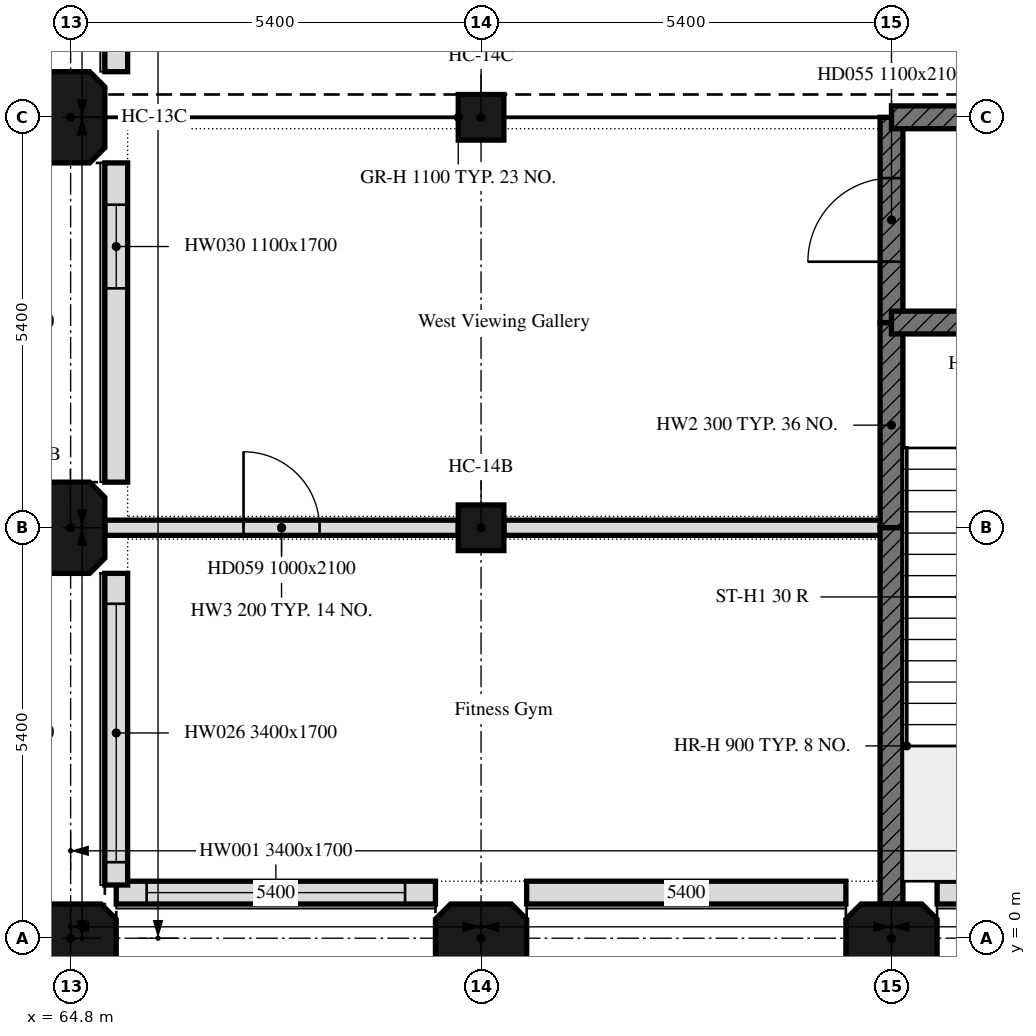
"""IFC4 building model, lengths in metres.
Left out: names, types, materials, properties, quantities, classifications, styles, units other than length and angle.
Written with IfcOpenShell. Run it as: python <this file> out.ifc"""

import sys

from ifc_helpers import new_model, si_unit, direction, frame, frame_2d, origin, origin_2d, place, context, subcontext, project, spatial, polyline, rectangle, outline, extrude, element, fill, save


model = new_model("IFC4")
c1 = context("Model", 3, precision=1e-05, world=origin(), true_north=direction((0.0, 1.0)))
c2 = subcontext(c1, "Body", "Model", "MODEL_VIEW")
j1 = project(units=[si_unit("LENGTHUNIT", "METRE"), si_unit("PLANEANGLEUNIT", "RADIAN")], contexts=[c1])
p1 = place(None, origin())
s1 = spatial("IfcSite", under=j1, at=p1, CompositionType="ELEMENT")
p2 = place(p1, origin())
s2 = spatial("IfcBuilding", under=s1, at=p2, CompositionType="ELEMENT")
p3 = place(p2, frame((0.0, 0.0, 14.4)))
s3 = spatial("IfcBuildingStorey", under=s2, at=p3, CompositionType="ELEMENT", Elevation=14.4)
for number, where, z_axis, x_axis in (
    (1, (64.8, 0.0, 0.0), (0.0, 0.0, 1.0), (1.0, 0.0, 0.0)),
    (2, (64.8, 5.4, 0.0), (0.0, 0.0, 1.0), (0.0, 1.0, 0.0)),
    (3, (64.8, 10.8, 0.0), (0.0, 0.0, 1.0), (0.0, 1.0, 0.0)),
    (4, (70.2, 0.0, 0.0), (0.0, 0.0, 1.0), (1.0, 0.0, 0.0)),
):
    element("IfcColumn", number, at=place(p3, frame(where, z_axis=z_axis, x_axis=x_axis)), inside=s3, PredefinedType="COLUMN", context=c2, shape_type="SweptSolid", body=[
        extrude(outline(polyline([(-0.4, -0.45), (0.4, -0.45), (0.6, -0.25), (0.6, 0.25), (0.4, 0.45), (-0.4, 0.45), (-0.6, 0.25), (-0.6, -0.25), (-0.4, -0.45)])), origin(), (0.0, 0.0, 1.0), 5.1),
    ])
for number, where, z_axis, x_axis in (
    (5, (70.2, 5.4, 0.0), (0.0, 0.0, 1.0), (1.0, 0.0, 0.0)),
    (6, (70.2, 10.8, 0.0), (0.0, 0.0, 1.0), (1.0, 0.0, 0.0)),
):
    element("IfcColumn", number, at=place(p3, frame(where, z_axis=z_axis, x_axis=x_axis)), inside=s3, PredefinedType="COLUMN", context=c2, shape_type="SweptSolid", body=[
        extrude(rectangle(XDim=0.6, YDim=0.6, at=origin_2d()), origin(), (0.0, 0.0, 1.0), 5.1),
    ])
p4 = place(p3, frame((75.6, 0.0, 0.0), z_axis=(0.0, 0.0, 1.0), x_axis=(1.0, 0.0, 0.0)))
e7 = element("IfcColumn", 7, at=p4, inside=s3, PredefinedType="COLUMN", context=c2, shape_type="SweptSolid", body=[
    extrude(outline(polyline([(-0.4, -0.45), (0.4, -0.45), (0.6, -0.25), (0.6, 0.25), (0.4, 0.45), (-0.4, 0.45), (-0.6, 0.25), (-0.6, -0.25), (-0.4, -0.45)])), origin(), (0.0, 0.0, 1.0), 5.1),
])
p5 = place(p3, frame((65.4, 0.6, 0.0), z_axis=(0.0, 0.0, 1.0), x_axis=(1.0, 0.0, 0.0)))
e8 = element("IfcWall", 8, at=p5, inside=s3, PredefinedType="SOLIDWALL", context=c2, shape_type="SweptSolid", body=[
    extrude(rectangle(XDim=4.2, YDim=0.3, at=frame_2d((2.1, 0.0))), origin(), (0.0, 0.0, 1.0), 5.1),
])
p6 = place(p5, frame((0.4, 0.0, 0.9)))
e9 = element("IfcOpeningElement", 9, at=p6, cuts=e8, PredefinedType="OPENING", context=c2, shape_type="SweptSolid", body=[
    extrude(rectangle(XDim=3.4, YDim=1.7, at=frame_2d((1.7, 0.85))), frame((0.0, 0.15, 0.0), z_axis=(0.0, -1.0, 0.0), x_axis=(1.0, 0.0, 0.0)), (0.0, 0.0, 1.0), 0.3),
])
for number, where, z_axis, x_axis in (
    (10, (70.8, 0.6, 0.0), (0.0, 0.0, 1.0), (1.0, 0.0, 0.0)),
    (11, (76.2, 0.6, 0.0), (0.0, 0.0, 1.0), (1.0, 0.0, 0.0)),
):
    element("IfcWall", number, at=place(p3, frame(where, z_axis=z_axis, x_axis=x_axis)), inside=s3, PredefinedType="SOLIDWALL", context=c2, shape_type="SweptSolid", body=[
        extrude(rectangle(XDim=4.2, YDim=0.3, at=frame_2d((2.1, 0.0))), origin(), (0.0, 0.0, 1.0), 5.1),
    ])
p7 = place(p3, frame((65.4, 0.7, 0.0), z_axis=(0.0, 0.0, 1.0), x_axis=(0.0, 1.0, 0.0)))
e12 = element("IfcWall", 12, at=p7, inside=s3, PredefinedType="SOLIDWALL", context=c2, shape_type="SweptSolid", body=[
    extrude(rectangle(XDim=4.1, YDim=0.3, at=frame_2d((2.05, 0.0))), origin(), (0.0, 0.0, 1.0), 5.1),
])
p8 = place(p7, frame((0.3, 0.0, 0.9)))
e13 = element("IfcOpeningElement", 13, at=p8, cuts=e12, PredefinedType="OPENING", context=c2, shape_type="SweptSolid", body=[
    extrude(rectangle(XDim=3.4, YDim=1.7, at=frame_2d((1.7, 0.85))), frame((0.0, 0.15, 0.0), z_axis=(0.0, -1.0, 0.0), x_axis=(1.0, 0.0, 0.0)), (0.0, 0.0, 1.0), 0.3),
])
p9 = place(p3, frame((65.4, 6.0, 0.0), z_axis=(0.0, 0.0, 1.0), x_axis=(0.0, 1.0, 0.0)))
e14 = element("IfcWall", 14, at=p9, inside=s3, PredefinedType="SOLIDWALL", context=c2, shape_type="SweptSolid", body=[
    extrude(rectangle(XDim=4.2, YDim=0.3, at=frame_2d((2.1, 0.0))), origin(), (0.0, 0.0, 1.0), 5.1),
])
p10 = place(p9, frame((2.55, 0.0, 0.9)))
e15 = element("IfcOpeningElement", 15, at=p10, cuts=e14, PredefinedType="OPENING", context=c2, shape_type="SweptSolid", body=[
    extrude(rectangle(XDim=1.1, YDim=1.7, at=frame_2d((0.55, 0.85))), frame((0.0, 0.15, 0.0), z_axis=(0.0, -1.0, 0.0), x_axis=(1.0, 0.0, 0.0)), (0.0, 0.0, 1.0), 0.3),
])
p11 = place(p3, frame((65.4, 11.4, 0.0), z_axis=(0.0, 0.0, 1.0), x_axis=(0.0, 1.0, 0.0)))
e16 = element("IfcWall", 16, at=p11, inside=s3, PredefinedType="SOLIDWALL", context=c2, shape_type="SweptSolid", body=[
    extrude(rectangle(XDim=4.2, YDim=0.3, at=frame_2d((2.1, 0.0))), origin(), (0.0, 0.0, 1.0), 5.4),
])
p12 = place(p11, frame((0.4, 0.0, 0.9)))
e17 = element("IfcOpeningElement", 17, at=p12, cuts=e16, PredefinedType="OPENING", context=c2, shape_type="SweptSolid", body=[
    extrude(rectangle(XDim=3.4, YDim=1.7, at=frame_2d((1.7, 0.85))), frame((0.0, 0.15, 0.0), z_axis=(0.0, -1.0, 0.0), x_axis=(1.0, 0.0, 0.0)), (0.0, 0.0, 1.0), 0.3),
])
p13 = place(p3, frame((65.25, 5.4, 0.0), z_axis=(0.0, 0.0, 1.0), x_axis=(1.0, 0.0, 0.0)))
e18 = element("IfcWall", 18, at=p13, inside=s3, PredefinedType="PARTITIONING", context=c2, shape_type="SweptSolid", body=[
    extrude(rectangle(XDim=4.65, YDim=0.2, at=frame_2d((2.325, 0.0))), origin(), (0.0, 0.0, 1.0), 5.1),
])
p14 = place(p13, frame((1.825, 0.0, 0.0)))
e19 = element("IfcOpeningElement", 19, at=p14, cuts=e18, PredefinedType="OPENING", context=c2, shape_type="SweptSolid", body=[
    extrude(rectangle(XDim=1.0, YDim=2.1, at=frame_2d((0.5, 1.05))), frame((0.0, 0.1, 0.0), z_axis=(0.0, -1.0, 0.0), x_axis=(1.0, 0.0, 0.0)), (0.0, 0.0, 1.0), 0.2),
])
p15 = place(p3, frame((70.5, 5.4, 0.0), z_axis=(0.0, 0.0, 1.0), x_axis=(1.0, 0.0, 0.0)))
e20 = element("IfcWall", 20, at=p15, inside=s3, PredefinedType="PARTITIONING", context=c2, shape_type="SweptSolid", body=[
    extrude(rectangle(XDim=5.1, YDim=0.2, at=frame_2d((2.55, 0.0))), origin(), (0.0, 0.0, 1.0), 5.1),
])
p16 = place(p3, frame((75.6, 5.4, 0.0), z_axis=(0.0, 0.0, 1.0), x_axis=(0.0, 1.0, 0.0)))
e21 = element("IfcWall", 21, at=p16, inside=s3, PredefinedType="SHEAR", context=c2, shape_type="SweptSolid", body=[
    extrude(rectangle(XDim=2.7, YDim=0.3, at=frame_2d((1.35, 0.0))), origin(), (0.0, 0.0, 1.0), 5.1),
])
p17 = place(p3, frame((75.6, 8.1, 0.0), z_axis=(0.0, 0.0, 1.0), x_axis=(0.0, 1.0, 0.0)))
e22 = element("IfcWall", 22, at=p17, inside=s3, PredefinedType="SHEAR", context=c2, shape_type="SweptSolid", body=[
    extrude(rectangle(XDim=2.7, YDim=0.3, at=frame_2d((1.35, 0.0))), origin(), (0.0, 0.0, 1.0), 5.1),
])
p18 = place(p17, frame((0.8, 0.0, 0.0)))
e23 = element("IfcOpeningElement", 23, at=p18, cuts=e22, PredefinedType="OPENING", context=c2, shape_type="SweptSolid", body=[
    extrude(rectangle(XDim=1.1, YDim=2.1, at=frame_2d((0.55, 1.05))), frame((0.0, 0.15, 0.0), z_axis=(0.0, -1.0, 0.0), x_axis=(1.0, 0.0, 0.0)), (0.0, 0.0, 1.0), 0.3),
])
p19 = place(p3, frame((75.6, 0.45, 0.0), z_axis=(0.0, 0.0, 1.0), x_axis=(0.0, 1.0, 0.0)))
e24 = element("IfcWall", 24, at=p19, inside=s3, PredefinedType="SHEAR", context=c2, shape_type="SweptSolid", body=[
    extrude(rectangle(XDim=4.95, YDim=0.3, at=frame_2d((2.475, 0.0))), origin(), (0.0, 0.0, 1.0), 5.1),
])
p20 = place(p3, frame((75.6, 8.1, 0.0), z_axis=(0.0, 0.0, 1.0), x_axis=(1.0, 0.0, 0.0)))
e25 = element("IfcWall", 25, at=p20, inside=s3, PredefinedType="SHEAR", context=c2, shape_type="SweptSolid", body=[
    extrude(rectangle(XDim=3.45, YDim=0.3, at=frame_2d((1.725, 0.0))), origin(), (0.0, 0.0, 1.0), 5.1),
])
p21 = place(p20, frame((1.175, 0.0, 0.0)))
e26 = element("IfcOpeningElement", 26, at=p21, cuts=e25, PredefinedType="OPENING", context=c2, shape_type="SweptSolid", body=[
    extrude(rectangle(XDim=1.1, YDim=2.1, at=frame_2d((0.55, 1.05))), frame((0.0, 0.15, 0.0), z_axis=(0.0, -1.0, 0.0), x_axis=(1.0, 0.0, 0.0)), (0.0, 0.0, 1.0), 0.3),
])
p22 = place(p3, frame((75.6, 10.8, 0.0), z_axis=(0.0, 0.0, 1.0), x_axis=(1.0, 0.0, 0.0)))
e27 = element("IfcWall", 27, at=p22, inside=s3, PredefinedType="SHEAR", context=c2, shape_type="SweptSolid", body=[
    extrude(rectangle(XDim=5.4, YDim=0.3, at=frame_2d((2.7, 0.0))), origin(), (0.0, 0.0, 1.0), 5.1),
])
p23 = place(p6, origin())
e28 = element("IfcWindow", 28, at=p23, inside=s3, PartitioningType="SINGLE_PANEL", PredefinedType="WINDOW", context=c2, shape_type="SweptSolid", body=[
    extrude(rectangle(XDim=3.4, YDim=1.7, at=frame_2d((1.7, 0.85))), frame((0.0, 0.03, 0.0), z_axis=(0.0, -1.0, 0.0), x_axis=(1.0, 0.0, 0.0)), (0.0, 0.0, 1.0), 0.06),
])
fill(e9, e28)
p24 = place(p8, origin())
e29 = element("IfcWindow", 29, at=p24, inside=s3, PartitioningType="SINGLE_PANEL", PredefinedType="WINDOW", context=c2, shape_type="SweptSolid", body=[
    extrude(rectangle(XDim=3.4, YDim=1.7, at=frame_2d((1.7, 0.85))), frame((0.0, 0.03, 0.0), z_axis=(0.0, -1.0, 0.0), x_axis=(1.0, 0.0, 0.0)), (0.0, 0.0, 1.0), 0.06),
])
fill(e13, e29)
p25 = place(p10, origin())
e30 = element("IfcWindow", 30, at=p25, inside=s3, PartitioningType="SINGLE_PANEL", PredefinedType="WINDOW", context=c2, shape_type="SweptSolid", body=[
    extrude(rectangle(XDim=1.1, YDim=1.7, at=frame_2d((0.55, 0.85))), frame((0.0, 0.03, 0.0), z_axis=(0.0, -1.0, 0.0), x_axis=(1.0, 0.0, 0.0)), (0.0, 0.0, 1.0), 0.06),
])
fill(e15, e30)
p26 = place(p18, origin())
e31 = element("IfcDoor", 31, at=p26, inside=s3, OperationType="SINGLE_SWING_LEFT", PredefinedType="DOOR", context=c2, shape_type="SweptSolid", body=[
    extrude(rectangle(XDim=1.1, YDim=2.1, at=frame_2d((0.55, 1.05))), frame((0.0, 0.025, 0.0), z_axis=(0.0, -1.0, 0.0), x_axis=(1.0, 0.0, 0.0)), (0.0, 0.0, 1.0), 0.05),
])
fill(e23, e31)
p27 = place(p14, origin())
e32 = element("IfcDoor", 32, at=p27, inside=s3, OperationType="SINGLE_SWING_LEFT", PredefinedType="DOOR", context=c2, shape_type="SweptSolid", body=[
    extrude(rectangle(XDim=1.0, YDim=2.1, at=frame_2d((0.5, 1.05))), frame((0.0, 0.025, 0.0), z_axis=(0.0, -1.0, 0.0), x_axis=(1.0, 0.0, 0.0)), (0.0, 0.0, 1.0), 0.05),
])
fill(e19, e32)
save(model, sys.argv[1])
